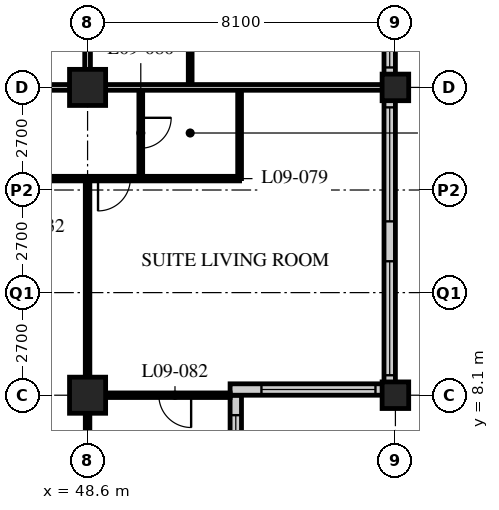
"""IFC4 building model, lengths in metres.
Left out: names, types, materials, properties, quantities, classifications, styles, units other than length and angle.
Written with IfcOpenShell. Run it as: python <this file> out.ifc"""

import sys

from ifc_helpers import new_model, si_unit, direction, frame, frame_2d, origin, origin_2d, place, context, subcontext, project, spatial, rectangle, hollow_rectangle, extrude, element, fill, save


model = new_model("IFC4")
c1 = context("Model", 3, precision=1e-05, world=origin(), true_north=direction((0.0, 1.0)))
c2 = subcontext(c1, "Body", "Model", "MODEL_VIEW")
j1 = project(units=[si_unit("LENGTHUNIT", "METRE"), si_unit("PLANEANGLEUNIT", "RADIAN")], contexts=[c1])
p1 = place(None, origin())
s1 = spatial("IfcSite", under=j1, at=p1, CompositionType="ELEMENT")
p2 = place(p1, origin())
s2 = spatial("IfcBuilding", under=s1, at=p2, CompositionType="ELEMENT")
p3 = place(p2, frame((0.0, 0.0, 43.2)))
s3 = spatial("IfcBuildingStorey", under=s2, at=p3, CompositionType="ELEMENT", Elevation=43.2)
for number, where, z_axis, x_axis in (
    (1, (48.6, 8.1, 0.0), (0.0, 0.0, 1.0), (1.0, 0.0, 0.0)),
    (2, (48.6, 16.2, 0.0), (0.0, 0.0, 1.0), (1.0, 0.0, 0.0)),
):
    element("IfcColumn", number, at=place(p3, frame(where, z_axis=z_axis, x_axis=x_axis)), inside=s3, PredefinedType="COLUMN", context=c2, shape_type="SweptSolid", body=[
        extrude(hollow_rectangle(XDim=0.95, YDim=0.95, WallThickness=0.095, at=origin_2d()), origin(), (0.0, 0.0, 1.0), 3.4),
    ])
for number, where, z_axis, x_axis in (
    (3, (56.7, 8.1, 0.0), (0.0, 0.0, 1.0), (1.0, 0.0, 0.0)),
    (4, (56.7, 16.2, 0.0), (0.0, 0.0, 1.0), (1.0, 0.0, 0.0)),
):
    element("IfcColumn", number, at=place(p3, frame(where, z_axis=z_axis, x_axis=x_axis)), inside=s3, PredefinedType="COLUMN", context=c2, shape_type="SweptSolid", body=[
        extrude(hollow_rectangle(XDim=0.7, YDim=0.7, WallThickness=0.06, at=origin_2d()), origin(), (0.0, 0.0, 1.0), 3.4),
    ])
p4 = place(p3, frame((52.5, 4.35, 0.0), z_axis=(0.0, 0.0, 1.0), x_axis=(0.0, 1.0, 0.0)))
e5 = element("IfcWall", 5, at=p4, inside=s3, PredefinedType="SOLIDWALL", context=c2, shape_type="SweptSolid", body=[
    extrude(rectangle(XDim=3.75, YDim=0.3, at=frame_2d((1.875, 0.0))), origin(), (0.0, 0.0, 1.0), 3.19),
])
p5 = place(p4, frame((0.225, 0.0, 0.9)))
e6 = element("IfcOpeningElement", 6, at=p5, cuts=e5, PredefinedType="OPENING", context=c2, shape_type="SweptSolid", body=[
    extrude(rectangle(XDim=3.0, YDim=1.5, at=frame_2d((1.5, 0.75))), frame((0.0, 0.16, 0.0), z_axis=(0.0, -1.0, 0.0), x_axis=(1.0, 0.0, 0.0)), (0.0, 0.0, 1.0), 0.32),
])
p6 = place(p3, frame((52.35, 8.25, 0.0), z_axis=(0.0, 0.0, 1.0), x_axis=(1.0, 0.0, 0.0)))
e7 = element("IfcWall", 7, at=p6, inside=s3, PredefinedType="SOLIDWALL", context=c2, shape_type="SweptSolid", body=[
    extrude(rectangle(XDim=4.35, YDim=0.3, at=frame_2d((2.175, 0.0))), origin(), (0.0, 0.0, 1.0), 3.19),
])
p7 = place(p6, frame((0.825, 0.0, 0.9)))
e8 = element("IfcOpeningElement", 8, at=p7, cuts=e7, PredefinedType="OPENING", context=c2, shape_type="SweptSolid", body=[
    extrude(rectangle(XDim=3.0, YDim=1.5, at=frame_2d((1.5, 0.75))), frame((0.0, 0.16, 0.0), z_axis=(0.0, -1.0, 0.0), x_axis=(1.0, 0.0, 0.0)), (0.0, 0.0, 1.0), 0.32),
])
p8 = place(p3, frame((56.55, 8.4, 0.0), z_axis=(0.0, 0.0, 1.0), x_axis=(0.0, 1.0, 0.0)))
e9 = element("IfcWall", 9, at=p8, inside=s3, PredefinedType="SOLIDWALL", context=c2, shape_type="SweptSolid", body=[
    extrude(rectangle(XDim=32.1, YDim=0.3, at=frame_2d((16.05, 0.0))), origin(), (0.0, 0.0, 1.0), 3.19),
])
p9 = place(p8, frame((0.225, 0.0, 0.9)))
e10 = element("IfcOpeningElement", 10, at=p9, cuts=e9, PredefinedType="OPENING", context=c2, shape_type="SweptSolid", body=[
    extrude(rectangle(XDim=3.0, YDim=2.0, at=frame_2d((1.5, 1.0))), frame((0.0, 0.16, 0.0), z_axis=(0.0, -1.0, 0.0), x_axis=(1.0, 0.0, 0.0)), (0.0, 0.0, 1.0), 0.32),
])
p10 = place(p8, frame((4.275, 0.0, 0.9)))
e11 = element("IfcOpeningElement", 11, at=p10, cuts=e9, PredefinedType="OPENING", context=c2, shape_type="SweptSolid", body=[
    extrude(rectangle(XDim=3.0, YDim=2.0, at=frame_2d((1.5, 1.0))), frame((0.0, 0.16, 0.0), z_axis=(0.0, -1.0, 0.0), x_axis=(1.0, 0.0, 0.0)), (0.0, 0.0, 1.0), 0.32),
])
p11 = place(p8, frame((8.325, 0.0, 0.9)))
e12 = element("IfcOpeningElement", 12, at=p11, cuts=e9, PredefinedType="OPENING", context=c2, shape_type="SweptSolid", body=[
    extrude(rectangle(XDim=3.0, YDim=2.0, at=frame_2d((1.5, 1.0))), frame((0.0, 0.16, 0.0), z_axis=(0.0, -1.0, 0.0), x_axis=(1.0, 0.0, 0.0)), (0.0, 0.0, 1.0), 0.32),
])
p12 = place(p8, frame((12.375, 0.0, 0.9)))
e13 = element("IfcOpeningElement", 13, at=p12, cuts=e9, PredefinedType="OPENING", context=c2, shape_type="SweptSolid", body=[
    extrude(rectangle(XDim=3.0, YDim=2.0, at=frame_2d((1.5, 1.0))), frame((0.0, 0.16, 0.0), z_axis=(0.0, -1.0, 0.0), x_axis=(1.0, 0.0, 0.0)), (0.0, 0.0, 1.0), 0.32),
])
p13 = place(p8, frame((16.425, 0.0, 0.9)))
e14 = element("IfcOpeningElement", 14, at=p13, cuts=e9, PredefinedType="OPENING", context=c2, shape_type="SweptSolid", body=[
    extrude(rectangle(XDim=3.0, YDim=2.0, at=frame_2d((1.5, 1.0))), frame((0.0, 0.16, 0.0), z_axis=(0.0, -1.0, 0.0), x_axis=(1.0, 0.0, 0.0)), (0.0, 0.0, 1.0), 0.32),
])
p14 = place(p8, frame((20.475, 0.0, 0.9)))
e15 = element("IfcOpeningElement", 15, at=p14, cuts=e9, PredefinedType="OPENING", context=c2, shape_type="SweptSolid", body=[
    extrude(rectangle(XDim=3.0, YDim=2.0, at=frame_2d((1.5, 1.0))), frame((0.0, 0.16, 0.0), z_axis=(0.0, -1.0, 0.0), x_axis=(1.0, 0.0, 0.0)), (0.0, 0.0, 1.0), 0.32),
])
p15 = place(p8, frame((24.525, 0.0, 0.9)))
e16 = element("IfcOpeningElement", 16, at=p15, cuts=e9, PredefinedType="OPENING", context=c2, shape_type="SweptSolid", body=[
    extrude(rectangle(XDim=3.0, YDim=2.0, at=frame_2d((1.5, 1.0))), frame((0.0, 0.16, 0.0), z_axis=(0.0, -1.0, 0.0), x_axis=(1.0, 0.0, 0.0)), (0.0, 0.0, 1.0), 0.32),
])
p16 = place(p8, frame((28.575, 0.0, 0.9)))
e17 = element("IfcOpeningElement", 17, at=p16, cuts=e9, PredefinedType="OPENING", context=c2, shape_type="SweptSolid", body=[
    extrude(rectangle(XDim=3.0, YDim=2.0, at=frame_2d((1.5, 1.0))), frame((0.0, 0.16, 0.0), z_axis=(0.0, -1.0, 0.0), x_axis=(1.0, 0.0, 0.0)), (0.0, 0.0, 1.0), 0.32),
])
p17 = place(p3, frame((8.1, 16.2, 0.0), z_axis=(0.0, 0.0, 1.0), x_axis=(1.0, 0.0, 0.0)))
e18 = element("IfcWall", 18, at=p17, inside=s3, PredefinedType="PARTITIONING", context=c2, shape_type="SweptSolid", body=[
    extrude(rectangle(XDim=40.5, YDim=0.15, at=frame_2d((20.25, 0.0))), origin(), (0.0, 0.0, 1.0), 2.578),
])
p18 = place(p17, frame((4.35, 0.0, 0.0)))
e19 = element("IfcOpeningElement", 19, at=p18, cuts=e18, PredefinedType="OPENING", context=c2, shape_type="SweptSolid", body=[
    extrude(rectangle(XDim=1.0, YDim=2.1, at=frame_2d((0.5, 1.05))), frame((0.0, 0.085, 0.0), z_axis=(0.0, -1.0, 0.0), x_axis=(1.0, 0.0, 0.0)), (0.0, 0.0, 1.0), 0.17),
])
p19 = place(p17, frame((10.85, 0.0, 0.0)))
e20 = element("IfcOpeningElement", 20, at=p19, cuts=e18, PredefinedType="OPENING", context=c2, shape_type="SweptSolid", body=[
    extrude(rectangle(XDim=1.0, YDim=2.1, at=frame_2d((0.5, 1.05))), frame((0.0, 0.085, 0.0), z_axis=(0.0, -1.0, 0.0), x_axis=(1.0, 0.0, 0.0)), (0.0, 0.0, 1.0), 0.17),
])
p20 = place(p17, frame((12.75, 0.0, 0.0)))
e21 = element("IfcOpeningElement", 21, at=p20, cuts=e18, PredefinedType="OPENING", context=c2, shape_type="SweptSolid", body=[
    extrude(rectangle(XDim=1.0, YDim=2.1, at=frame_2d((0.5, 1.05))), frame((0.0, 0.085, 0.0), z_axis=(0.0, -1.0, 0.0), x_axis=(1.0, 0.0, 0.0)), (0.0, 0.0, 1.0), 0.17),
])
p21 = place(p17, frame((18.95, 0.0, 0.0)))
e22 = element("IfcOpeningElement", 22, at=p21, cuts=e18, PredefinedType="OPENING", context=c2, shape_type="SweptSolid", body=[
    extrude(rectangle(XDim=1.0, YDim=2.1, at=frame_2d((0.5, 1.05))), frame((0.0, 0.085, 0.0), z_axis=(0.0, -1.0, 0.0), x_axis=(1.0, 0.0, 0.0)), (0.0, 0.0, 1.0), 0.17),
])
p22 = place(p17, frame((20.55, 0.0, 0.0)))
e23 = element("IfcOpeningElement", 23, at=p22, cuts=e18, PredefinedType="OPENING", context=c2, shape_type="SweptSolid", body=[
    extrude(rectangle(XDim=1.0, YDim=2.1, at=frame_2d((0.5, 1.05))), frame((0.0, 0.085, 0.0), z_axis=(0.0, -1.0, 0.0), x_axis=(1.0, 0.0, 0.0)), (0.0, 0.0, 1.0), 0.17),
])
p23 = place(p17, frame((27.05, 0.0, 0.0)))
e24 = element("IfcOpeningElement", 24, at=p23, cuts=e18, PredefinedType="OPENING", context=c2, shape_type="SweptSolid", body=[
    extrude(rectangle(XDim=1.0, YDim=2.1, at=frame_2d((0.5, 1.05))), frame((0.0, 0.085, 0.0), z_axis=(0.0, -1.0, 0.0), x_axis=(1.0, 0.0, 0.0)), (0.0, 0.0, 1.0), 0.17),
])
p24 = place(p17, frame((28.95, 0.0, 0.0)))
e25 = element("IfcOpeningElement", 25, at=p24, cuts=e18, PredefinedType="OPENING", context=c2, shape_type="SweptSolid", body=[
    extrude(rectangle(XDim=1.0, YDim=2.1, at=frame_2d((0.5, 1.05))), frame((0.0, 0.085, 0.0), z_axis=(0.0, -1.0, 0.0), x_axis=(1.0, 0.0, 0.0)), (0.0, 0.0, 1.0), 0.17),
])
p25 = place(p17, frame((34.85, 0.0, 0.0)))
e26 = element("IfcOpeningElement", 26, at=p25, cuts=e18, PredefinedType="OPENING", context=c2, shape_type="SweptSolid", body=[
    extrude(rectangle(XDim=1.0, YDim=2.1, at=frame_2d((0.5, 1.05))), frame((0.0, 0.085, 0.0), z_axis=(0.0, -1.0, 0.0), x_axis=(1.0, 0.0, 0.0)), (0.0, 0.0, 1.0), 0.17),
])
p26 = place(p17, frame((1.525, 0.0, 0.0)))
e27 = element("IfcOpeningElement", 27, at=p26, cuts=e18, PredefinedType="OPENING", context=c2, shape_type="SweptSolid", body=[
    extrude(rectangle(XDim=1.0, YDim=2.1, at=frame_2d((0.5, 1.05))), frame((0.0, 0.085, 0.0), z_axis=(0.0, -1.0, 0.0), x_axis=(1.0, 0.0, 0.0)), (0.0, 0.0, 1.0), 0.17),
])
p27 = place(p17, frame((37.975, 0.0, 0.0)))
e28 = element("IfcOpeningElement", 28, at=p27, cuts=e18, PredefinedType="OPENING", context=c2, shape_type="SweptSolid", body=[
    extrude(rectangle(XDim=1.0, YDim=2.1, at=frame_2d((0.5, 1.05))), frame((0.0, 0.085, 0.0), z_axis=(0.0, -1.0, 0.0), x_axis=(1.0, 0.0, 0.0)), (0.0, 0.0, 1.0), 0.17),
])
p28 = place(p3, frame((48.6, 16.2, 0.0), z_axis=(0.0, 0.0, 1.0), x_axis=(0.0, 1.0, 0.0)))
e29 = element("IfcWall", 29, at=p28, inside=s3, PredefinedType="PARTITIONING", context=c2, shape_type="SweptSolid", body=[
    extrude(rectangle(XDim=26.1, YDim=0.15, at=frame_2d((13.05, 0.0))), origin(), (0.0, 0.0, 1.0), 2.578),
])
p29 = place(p28, frame((2.75, 0.0, 0.0)))
e30 = element("IfcOpeningElement", 30, at=p29, cuts=e29, PredefinedType="OPENING", context=c2, shape_type="SweptSolid", body=[
    extrude(rectangle(XDim=1.0, YDim=2.1, at=frame_2d((0.5, 1.05))), frame((0.0, 0.085, 0.0), z_axis=(0.0, -1.0, 0.0), x_axis=(1.0, 0.0, 0.0)), (0.0, 0.0, 1.0), 0.17),
])
p30 = place(p28, frame((4.35, 0.0, 0.0)))
e31 = element("IfcOpeningElement", 31, at=p30, cuts=e29, PredefinedType="OPENING", context=c2, shape_type="SweptSolid", body=[
    extrude(rectangle(XDim=1.0, YDim=2.1, at=frame_2d((0.5, 1.05))), frame((0.0, 0.085, 0.0), z_axis=(0.0, -1.0, 0.0), x_axis=(1.0, 0.0, 0.0)), (0.0, 0.0, 1.0), 0.17),
])
p31 = place(p28, frame((10.85, 0.0, 0.0)))
e32 = element("IfcOpeningElement", 32, at=p31, cuts=e29, PredefinedType="OPENING", context=c2, shape_type="SweptSolid", body=[
    extrude(rectangle(XDim=1.0, YDim=2.1, at=frame_2d((0.5, 1.05))), frame((0.0, 0.085, 0.0), z_axis=(0.0, -1.0, 0.0), x_axis=(1.0, 0.0, 0.0)), (0.0, 0.0, 1.0), 0.17),
])
p32 = place(p28, frame((12.45, 0.0, 0.0)))
e33 = element("IfcOpeningElement", 33, at=p32, cuts=e29, PredefinedType="OPENING", context=c2, shape_type="SweptSolid", body=[
    extrude(rectangle(XDim=1.0, YDim=2.1, at=frame_2d((0.5, 1.05))), frame((0.0, 0.085, 0.0), z_axis=(0.0, -1.0, 0.0), x_axis=(1.0, 0.0, 0.0)), (0.0, 0.0, 1.0), 0.17),
])
p33 = place(p28, frame((18.65, 0.0, 0.0)))
e34 = element("IfcOpeningElement", 34, at=p33, cuts=e29, PredefinedType="OPENING", context=c2, shape_type="SweptSolid", body=[
    extrude(rectangle(XDim=1.0, YDim=2.1, at=frame_2d((0.5, 1.05))), frame((0.0, 0.085, 0.0), z_axis=(0.0, -1.0, 0.0), x_axis=(1.0, 0.0, 0.0)), (0.0, 0.0, 1.0), 0.17),
])
p34 = place(p28, frame((22.7, 0.0, 0.0)))
e35 = element("IfcOpeningElement", 35, at=p34, cuts=e29, PredefinedType="OPENING", context=c2, shape_type="SweptSolid", body=[
    extrude(rectangle(XDim=1.0, YDim=2.1, at=frame_2d((0.5, 1.05))), frame((0.0, 0.085, 0.0), z_axis=(0.0, -1.0, 0.0), x_axis=(1.0, 0.0, 0.0)), (0.0, 0.0, 1.0), 0.17),
])
p35 = place(p3, frame((51.3, 16.2, 0.0), z_axis=(0.0, 0.0, 1.0), x_axis=(0.0, 1.0, 0.0)))
e36 = element("IfcWall", 36, at=p35, inside=s3, PredefinedType="PARTITIONING", context=c2, shape_type="SweptSolid", body=[
    extrude(rectangle(XDim=2.6, YDim=0.1, at=frame_2d((1.3, 0.0))), origin(), (0.0, 0.0, 1.0), 3.19),
])
p36 = place(p3, frame((44.55, 13.8, 0.0), z_axis=(0.0, 0.0, 1.0), x_axis=(1.0, 0.0, 0.0)))
e37 = element("IfcWall", 37, at=p36, inside=s3, PredefinedType="PARTITIONING", context=c2, shape_type="SweptSolid", body=[
    extrude(rectangle(XDim=8.05, YDim=0.12, at=frame_2d((4.025, 0.0))), origin(), (0.0, 0.0, 1.0), 3.19),
])
p37 = place(p36, frame((0.475, 0.0, 0.0)))
e38 = element("IfcOpeningElement", 38, at=p37, cuts=e37, PredefinedType="OPENING", context=c2, shape_type="SweptSolid", body=[
    extrude(rectangle(XDim=0.85, YDim=2.1, at=frame_2d((0.425, 1.05))), frame((0.0, 0.07, 0.0), z_axis=(0.0, -1.0, 0.0), x_axis=(1.0, 0.0, 0.0)), (0.0, 0.0, 1.0), 0.14),
])
p38 = place(p36, frame((4.325, 0.0, 0.0)))
e39 = element("IfcOpeningElement", 39, at=p38, cuts=e37, PredefinedType="OPENING", context=c2, shape_type="SweptSolid", body=[
    extrude(rectangle(XDim=0.85, YDim=2.1, at=frame_2d((0.425, 1.05))), frame((0.0, 0.07, 0.0), z_axis=(0.0, -1.0, 0.0), x_axis=(1.0, 0.0, 0.0)), (0.0, 0.0, 1.0), 0.14),
])
p39 = place(p3, frame((50.0, 16.2, 0.0), z_axis=(0.0, 0.0, 1.0), x_axis=(0.0, -1.0, 0.0)))
e40 = element("IfcWall", 40, at=p39, inside=s3, PredefinedType="PARTITIONING", context=c2, shape_type="SweptSolid", body=[
    extrude(rectangle(XDim=2.4, YDim=0.1, at=frame_2d((1.2, 0.0))), origin(), (0.0, 0.0, 1.0), 3.19),
])
p40 = place(p39, frame((0.8, 0.0, 0.0)))
e41 = element("IfcOpeningElement", 41, at=p40, cuts=e40, PredefinedType="OPENING", context=c2, shape_type="SweptSolid", body=[
    extrude(rectangle(XDim=0.8, YDim=2.1, at=frame_2d((0.4, 1.05))), frame((0.0, 0.06, 0.0), z_axis=(0.0, -1.0, 0.0), x_axis=(1.0, 0.0, 0.0)), (0.0, 0.0, 1.0), 0.12),
])
p41 = place(p3, frame((52.6, 16.2, 0.0), z_axis=(0.0, 0.0, 1.0), x_axis=(0.0, -1.0, 0.0)))
e42 = element("IfcWall", 42, at=p41, inside=s3, PredefinedType="PARTITIONING", context=c2, shape_type="SweptSolid", body=[
    extrude(rectangle(XDim=2.4, YDim=0.1, at=frame_2d((1.2, 0.0))), origin(), (0.0, 0.0, 1.0), 3.19),
])
p42 = place(p3, frame((48.6, 13.8, 0.0), z_axis=(0.0, 0.0, 1.0), x_axis=(0.0, -1.0, 0.0)))
e43 = element("IfcWall", 43, at=p42, inside=s3, PredefinedType="PARTITIONING", context=c2, shape_type="SweptSolid", body=[
    extrude(rectangle(XDim=9.45, YDim=0.12, at=frame_2d((4.725, 0.0))), origin(), (0.0, 0.0, 1.0), 2.578),
])
p43 = place(p3, frame((48.6, 8.1, 0.0), z_axis=(0.0, 0.0, 1.0), x_axis=(1.0, 0.0, 0.0)))
e44 = element("IfcWall", 44, at=p43, inside=s3, PredefinedType="PARTITIONING", context=c2, shape_type="SweptSolid", body=[
    extrude(rectangle(XDim=3.75, YDim=0.12, at=frame_2d((1.875, 0.0))), origin(), (0.0, 0.0, 1.0), 2.578),
])
p44 = place(p43, frame((1.875, 0.0, 0.0)))
e45 = element("IfcOpeningElement", 45, at=p44, cuts=e44, PredefinedType="OPENING", context=c2, shape_type="SweptSolid", body=[
    extrude(rectangle(XDim=0.85, YDim=2.1, at=frame_2d((0.425, 1.05))), frame((0.0, 0.07, 0.0), z_axis=(0.0, -1.0, 0.0), x_axis=(1.0, 0.0, 0.0)), (0.0, 0.0, 1.0), 0.14),
])
p45 = place(p3, frame((48.6, 16.2, 0.0), z_axis=(0.0, 0.0, 1.0), x_axis=(1.0, 0.0, 0.0)))
e46 = element("IfcWall", 46, at=p45, inside=s3, PredefinedType="PARTITIONING", context=c2, shape_type="SweptSolid", body=[
    extrude(rectangle(XDim=7.8, YDim=0.15, at=frame_2d((3.9, 0.0))), origin(), (0.0, 0.0, 1.0), 2.578),
])
p46 = place(p5, origin())
e47 = element("IfcWindow", 47, at=p46, inside=s3, PartitioningType="SINGLE_PANEL", PredefinedType="WINDOW", context=c2, shape_type="SweptSolid", body=[
    extrude(rectangle(XDim=3.0, YDim=1.5, at=frame_2d((1.5, 0.75))), frame((0.0, 0.03, 0.0), z_axis=(0.0, -1.0, 0.0), x_axis=(1.0, 0.0, 0.0)), (0.0, 0.0, 1.0), 0.06),
])
fill(e6, e47)
p47 = place(p7, origin())
e48 = element("IfcWindow", 48, at=p47, inside=s3, PartitioningType="SINGLE_PANEL", PredefinedType="WINDOW", context=c2, shape_type="SweptSolid", body=[
    extrude(rectangle(XDim=3.0, YDim=1.5, at=frame_2d((1.5, 0.75))), frame((0.0, 0.03, 0.0), z_axis=(0.0, -1.0, 0.0), x_axis=(1.0, 0.0, 0.0)), (0.0, 0.0, 1.0), 0.06),
])
fill(e8, e48)
p48 = place(p9, origin())
e49 = element("IfcWindow", 49, at=p48, inside=s3, PartitioningType="SINGLE_PANEL", PredefinedType="WINDOW", context=c2, shape_type="SweptSolid", body=[
    extrude(rectangle(XDim=3.0, YDim=2.0, at=frame_2d((1.5, 1.0))), frame((0.0, 0.03, 0.0), z_axis=(0.0, -1.0, 0.0), x_axis=(1.0, 0.0, 0.0)), (0.0, 0.0, 1.0), 0.06),
])
fill(e10, e49)
p49 = place(p10, origin())
e50 = element("IfcWindow", 50, at=p49, inside=s3, PartitioningType="SINGLE_PANEL", PredefinedType="WINDOW", context=c2, shape_type="SweptSolid", body=[
    extrude(rectangle(XDim=3.0, YDim=2.0, at=frame_2d((1.5, 1.0))), frame((0.0, 0.03, 0.0), z_axis=(0.0, -1.0, 0.0), x_axis=(1.0, 0.0, 0.0)), (0.0, 0.0, 1.0), 0.06),
])
fill(e11, e50)
p50 = place(p11, origin())
e51 = element("IfcWindow", 51, at=p50, inside=s3, PartitioningType="SINGLE_PANEL", PredefinedType="WINDOW", context=c2, shape_type="SweptSolid", body=[
    extrude(rectangle(XDim=3.0, YDim=2.0, at=frame_2d((1.5, 1.0))), frame((0.0, 0.03, 0.0), z_axis=(0.0, -1.0, 0.0), x_axis=(1.0, 0.0, 0.0)), (0.0, 0.0, 1.0), 0.06),
])
fill(e12, e51)
p51 = place(p40, origin())
e52 = element("IfcDoor", 52, at=p51, inside=s3, OperationType="SINGLE_SWING_LEFT", PredefinedType="DOOR", context=c2, shape_type="SweptSolid", body=[
    extrude(rectangle(XDim=0.8, YDim=2.1, at=frame_2d((0.4, 1.05))), frame((0.0, 0.025, 0.0), z_axis=(0.0, -1.0, 0.0), x_axis=(1.0, 0.0, 0.0)), (0.0, 0.0, 1.0), 0.05),
])
fill(e41, e52)
p52 = place(p38, origin())
e53 = element("IfcDoor", 53, at=p52, inside=s3, OperationType="SINGLE_SWING_RIGHT", PredefinedType="DOOR", context=c2, shape_type="SweptSolid", body=[
    extrude(rectangle(XDim=0.85, YDim=2.1, at=frame_2d((0.425, 1.05))), frame((0.0, 0.025, 0.0), z_axis=(0.0, -1.0, 0.0), x_axis=(1.0, 0.0, 0.0)), (0.0, 0.0, 1.0), 0.05),
])
fill(e39, e53)
p53 = place(p44, origin())
e54 = element("IfcDoor", 54, at=p53, inside=s3, OperationType="SINGLE_SWING_LEFT", PredefinedType="DOOR", context=c2, shape_type="SweptSolid", body=[
    extrude(rectangle(XDim=0.85, YDim=2.1, at=frame_2d((0.425, 1.05))), frame((0.0, 0.025, 0.0), z_axis=(0.0, -1.0, 0.0), x_axis=(1.0, 0.0, 0.0)), (0.0, 0.0, 1.0), 0.05),
])
fill(e45, e54)
save(model, sys.argv[1])
